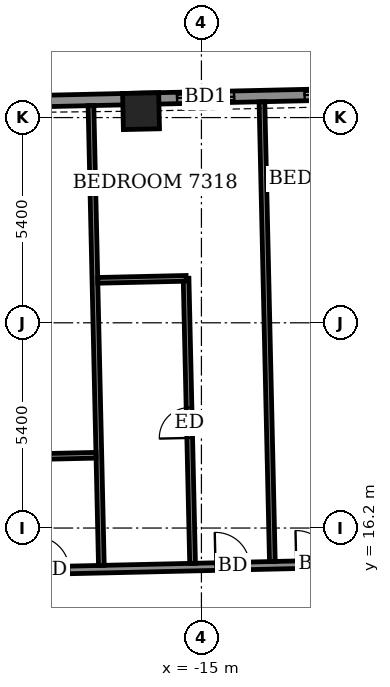
"""IFC4 building model, lengths in metres.
Left out: names, types, materials, properties, quantities, classifications, styles, units other than length and angle.
Written with IfcOpenShell. Run it as: python <this file> out.ifc"""

import sys

from ifc_helpers import new_model, si_unit, direction, frame, frame_2d, origin, origin_2d, place, context, subcontext, project, spatial, rectangle, extrude, element, fill, save


model = new_model("IFC4")
c1 = context("Model", 3, precision=1e-05, world=origin(), true_north=direction((0.0, 1.0)))
c2 = subcontext(c1, "Body", "Model", "MODEL_VIEW")
j1 = project(units=[si_unit("LENGTHUNIT", "METRE"), si_unit("PLANEANGLEUNIT", "RADIAN")], contexts=[c1])
p1 = place(None, origin())
s1 = spatial("IfcSite", under=j1, at=p1, CompositionType="ELEMENT")
p2 = place(p1, origin())
s2 = spatial("IfcBuilding", under=s1, at=p2, CompositionType="ELEMENT")
p3 = place(p2, frame((0.0, 0.0, 287.1)))
s3 = spatial("IfcBuildingStorey", under=s2, at=p3, CompositionType="ELEMENT", Elevation=287.1)
p4 = place(p3, frame((-16.589, 27.169, -0.55), z_axis=(0.0, 0.0, 1.0), x_axis=(-0.9997425919, -0.02268810132, 0.0)))
e1 = element("IfcColumn", 1, at=p4, inside=s3, PredefinedType="COLUMN", context=c2, shape_type="SweptSolid", body=[
    extrude(rectangle(XDim=0.95, YDim=0.95, at=origin_2d()), origin(), (0.0, 0.0, 1.0), 3.6),
])
p5 = place(p3, frame((26.216, 28.465, 0.0), z_axis=(0.0, 0.0, 1.0), x_axis=(-0.999742843677, -0.022677004157, 0.0)))
e2 = element("IfcWall", 2, at=p5, inside=s3, PredefinedType="SOLIDWALL", context=c2, shape_type="SweptSolid", body=[
    extrude(rectangle(XDim=49.836, YDim=0.3, at=frame_2d((24.918, 0.0))), origin(), (0.0, 0.0, 1.0), 2.5),
])
p6 = place(p5, frame((0.938, 0.0, 0.0)))
e3 = element("IfcOpeningElement", 3, at=p6, cuts=e2, PredefinedType="OPENING", context=c2, shape_type="SweptSolid", body=[
    extrude(rectangle(XDim=1.5, YDim=2.4, at=frame_2d((0.75, 1.2))), frame((0.0, 0.16, 0.0), z_axis=(0.0, -1.0, 0.0), x_axis=(1.0, 0.0, 0.0)), (0.0, 0.0, 1.0), 0.32),
])
p7 = place(p5, frame((4.087, 0.0, 0.0)))
e4 = element("IfcOpeningElement", 4, at=p7, cuts=e2, PredefinedType="OPENING", context=c2, shape_type="SweptSolid", body=[
    extrude(rectangle(XDim=1.5, YDim=2.4, at=frame_2d((0.75, 1.2))), frame((0.0, 0.16, 0.0), z_axis=(0.0, -1.0, 0.0), x_axis=(1.0, 0.0, 0.0)), (0.0, 0.0, 1.0), 0.32),
])
p8 = place(p5, frame((8.711, 0.0, 0.0)))
e5 = element("IfcOpeningElement", 5, at=p8, cuts=e2, PredefinedType="OPENING", context=c2, shape_type="SweptSolid", body=[
    extrude(rectangle(XDim=1.5, YDim=2.4, at=frame_2d((0.75, 1.2))), frame((0.0, 0.16, 0.0), z_axis=(0.0, -1.0, 0.0), x_axis=(1.0, 0.0, 0.0)), (0.0, 0.0, 1.0), 0.32),
])
p9 = place(p5, frame((12.067, 0.0, 0.0)))
e6 = element("IfcOpeningElement", 6, at=p9, cuts=e2, PredefinedType="OPENING", context=c2, shape_type="SweptSolid", body=[
    extrude(rectangle(XDim=1.5, YDim=2.4, at=frame_2d((0.75, 1.2))), frame((0.0, 0.16, 0.0), z_axis=(0.0, -1.0, 0.0), x_axis=(1.0, 0.0, 0.0)), (0.0, 0.0, 1.0), 0.32),
])
p10 = place(p5, frame((17.836, 0.0, 0.0)))
e7 = element("IfcOpeningElement", 7, at=p10, cuts=e2, PredefinedType="OPENING", context=c2, shape_type="SweptSolid", body=[
    extrude(rectangle(XDim=1.5, YDim=2.4, at=frame_2d((0.75, 1.2))), frame((0.0, 0.16, 0.0), z_axis=(0.0, -1.0, 0.0), x_axis=(1.0, 0.0, 0.0)), (0.0, 0.0, 1.0), 0.32),
])
p11 = place(p5, frame((22.849, 0.0, 0.0)))
e8 = element("IfcOpeningElement", 8, at=p11, cuts=e2, PredefinedType="OPENING", context=c2, shape_type="SweptSolid", body=[
    extrude(rectangle(XDim=1.5, YDim=2.4, at=frame_2d((0.75, 1.2))), frame((0.0, 0.16, 0.0), z_axis=(0.0, -1.0, 0.0), x_axis=(1.0, 0.0, 0.0)), (0.0, 0.0, 1.0), 0.32),
])
p12 = place(p5, frame((26.205, 0.0, 0.0)))
e9 = element("IfcOpeningElement", 9, at=p12, cuts=e2, PredefinedType="OPENING", context=c2, shape_type="SweptSolid", body=[
    extrude(rectangle(XDim=1.5, YDim=2.4, at=frame_2d((0.75, 1.2))), frame((0.0, 0.16, 0.0), z_axis=(0.0, -1.0, 0.0), x_axis=(1.0, 0.0, 0.0)), (0.0, 0.0, 1.0), 0.32),
])
p13 = place(p5, frame((32.011, 0.0, 0.0)))
e10 = element("IfcOpeningElement", 10, at=p13, cuts=e2, PredefinedType="OPENING", context=c2, shape_type="SweptSolid", body=[
    extrude(rectangle(XDim=1.5, YDim=2.4, at=frame_2d((0.75, 1.2))), frame((0.0, 0.16, 0.0), z_axis=(0.0, -1.0, 0.0), x_axis=(1.0, 0.0, 0.0)), (0.0, 0.0, 1.0), 0.32),
])
p14 = place(p5, frame((37.011, 0.0, 0.0)))
e11 = element("IfcOpeningElement", 11, at=p14, cuts=e2, PredefinedType="OPENING", context=c2, shape_type="SweptSolid", body=[
    extrude(rectangle(XDim=1.5, YDim=2.4, at=frame_2d((0.75, 1.2))), frame((0.0, 0.16, 0.0), z_axis=(0.0, -1.0, 0.0), x_axis=(1.0, 0.0, 0.0)), (0.0, 0.0, 1.0), 0.32),
])
p15 = place(p5, frame((40.367, 0.0, 0.0)))
e12 = element("IfcOpeningElement", 12, at=p15, cuts=e2, PredefinedType="OPENING", context=c2, shape_type="SweptSolid", body=[
    extrude(rectangle(XDim=1.5, YDim=2.4, at=frame_2d((0.75, 1.2))), frame((0.0, 0.16, 0.0), z_axis=(0.0, -1.0, 0.0), x_axis=(1.0, 0.0, 0.0)), (0.0, 0.0, 1.0), 0.32),
])
p16 = place(p5, frame((45.499, 0.0, 0.9)))
e13 = element("IfcOpeningElement", 13, at=p16, cuts=e2, PredefinedType="OPENING", context=c2, shape_type="SweptSolid", body=[
    extrude(rectangle(XDim=2.4, YDim=1.5, at=frame_2d((1.2, 0.75))), frame((0.0, 0.16, 0.0), z_axis=(0.0, -1.0, 0.0), x_axis=(1.0, 0.0, 0.0)), (0.0, 0.0, 1.0), 0.32),
])
p17 = place(p3, frame((-26.401, 14.918, 0.0), z_axis=(0.0, 0.0, 1.0), x_axis=(0.99974239733, 0.022696673341, 0.0)))
e14 = element("IfcWall", 14, at=p17, inside=s3, PredefinedType="PARTITIONING", context=c2, shape_type="SweptSolid", body=[
    extrude(rectangle(XDim=55.386, YDim=0.2, at=frame_2d((27.693, 0.0))), origin(), (0.0, 0.0, 1.0), 3.05),
])
p18 = place(p17, frame((52.889, 0.0, 0.0)))
e15 = element("IfcOpeningElement", 15, at=p18, cuts=e14, PredefinedType="OPENING", context=c2, shape_type="SweptSolid", body=[
    extrude(rectangle(XDim=1.0, YDim=2.1, at=frame_2d((0.5, 1.05))), frame((0.0, 0.11, 0.0), z_axis=(0.0, -1.0, 0.0), x_axis=(1.0, 0.0, 0.0)), (0.0, 0.0, 1.0), 0.22),
])
p19 = place(p17, frame((48.6, 0.0, 0.0)))
e16 = element("IfcOpeningElement", 16, at=p19, cuts=e14, PredefinedType="OPENING", context=c2, shape_type="SweptSolid", body=[
    extrude(rectangle(XDim=0.9, YDim=2.1, at=frame_2d((0.45, 1.05))), frame((0.0, 0.11, 0.0), z_axis=(0.0, -1.0, 0.0), x_axis=(1.0, 0.0, 0.0)), (0.0, 0.0, 1.0), 0.22),
])
p20 = place(p17, frame((41.8, 0.0, 0.0)))
e17 = element("IfcOpeningElement", 17, at=p20, cuts=e14, PredefinedType="OPENING", context=c2, shape_type="SweptSolid", body=[
    extrude(rectangle(XDim=0.9, YDim=2.1, at=frame_2d((0.45, 1.05))), frame((0.0, 0.11, 0.0), z_axis=(0.0, -1.0, 0.0), x_axis=(1.0, 0.0, 0.0)), (0.0, 0.0, 1.0), 0.22),
])
p21 = place(p17, frame((39.675, 0.0, 0.0)))
e18 = element("IfcOpeningElement", 18, at=p21, cuts=e14, PredefinedType="OPENING", context=c2, shape_type="SweptSolid", body=[
    extrude(rectangle(XDim=0.9, YDim=2.1, at=frame_2d((0.45, 1.05))), frame((0.0, 0.11, 0.0), z_axis=(0.0, -1.0, 0.0), x_axis=(1.0, 0.0, 0.0)), (0.0, 0.0, 1.0), 0.22),
])
p22 = place(p17, frame((32.675, 0.0, 0.0)))
e19 = element("IfcOpeningElement", 19, at=p22, cuts=e14, PredefinedType="OPENING", context=c2, shape_type="SweptSolid", body=[
    extrude(rectangle(XDim=0.9, YDim=2.1, at=frame_2d((0.45, 1.05))), frame((0.0, 0.11, 0.0), z_axis=(0.0, -1.0, 0.0), x_axis=(1.0, 0.0, 0.0)), (0.0, 0.0, 1.0), 0.22),
])
p23 = place(p17, frame((30.4, 0.0, 0.0)))
e20 = element("IfcOpeningElement", 20, at=p23, cuts=e14, PredefinedType="OPENING", context=c2, shape_type="SweptSolid", body=[
    extrude(rectangle(XDim=0.9, YDim=2.1, at=frame_2d((0.45, 1.05))), frame((0.0, 0.11, 0.0), z_axis=(0.0, -1.0, 0.0), x_axis=(1.0, 0.0, 0.0)), (0.0, 0.0, 1.0), 0.22),
])
p24 = place(p17, frame((23.225, 0.0, 0.0)))
e21 = element("IfcOpeningElement", 21, at=p24, cuts=e14, PredefinedType="OPENING", context=c2, shape_type="SweptSolid", body=[
    extrude(rectangle(XDim=0.9, YDim=2.1, at=frame_2d((0.45, 1.05))), frame((0.0, 0.11, 0.0), z_axis=(0.0, -1.0, 0.0), x_axis=(1.0, 0.0, 0.0)), (0.0, 0.0, 1.0), 0.22),
])
p25 = place(p17, frame((20.9, 0.0, 0.0)))
e22 = element("IfcOpeningElement", 22, at=p25, cuts=e14, PredefinedType="OPENING", context=c2, shape_type="SweptSolid", body=[
    extrude(rectangle(XDim=0.9, YDim=2.1, at=frame_2d((0.45, 1.05))), frame((0.0, 0.11, 0.0), z_axis=(0.0, -1.0, 0.0), x_axis=(1.0, 0.0, 0.0)), (0.0, 0.0, 1.0), 0.22),
])
p26 = place(p17, frame((13.9, 0.0, 0.0)))
e23 = element("IfcOpeningElement", 23, at=p26, cuts=e14, PredefinedType="OPENING", context=c2, shape_type="SweptSolid", body=[
    extrude(rectangle(XDim=0.9, YDim=2.1, at=frame_2d((0.45, 1.05))), frame((0.0, 0.11, 0.0), z_axis=(0.0, -1.0, 0.0), x_axis=(1.0, 0.0, 0.0)), (0.0, 0.0, 1.0), 0.22),
])
p27 = place(p17, frame((11.775, 0.0, 0.0)))
e24 = element("IfcOpeningElement", 24, at=p27, cuts=e14, PredefinedType="OPENING", context=c2, shape_type="SweptSolid", body=[
    extrude(rectangle(XDim=0.9, YDim=2.1, at=frame_2d((0.45, 1.05))), frame((0.0, 0.11, 0.0), z_axis=(0.0, -1.0, 0.0), x_axis=(1.0, 0.0, 0.0)), (0.0, 0.0, 1.0), 0.22),
])
p28 = place(p17, frame((1.65, 0.0, 0.0)))
e25 = element("IfcOpeningElement", 25, at=p28, cuts=e14, PredefinedType="OPENING", context=c2, shape_type="SweptSolid", body=[
    extrude(rectangle(XDim=1.0, YDim=2.1, at=frame_2d((0.5, 1.05))), frame((0.0, 0.11, 0.0), z_axis=(0.0, -1.0, 0.0), x_axis=(1.0, 0.0, 0.0)), (0.0, 0.0, 1.0), 0.22),
])
p29 = place(p17, frame((7.025, 0.0, 0.0)))
e26 = element("IfcOpeningElement", 26, at=p29, cuts=e14, PredefinedType="OPENING", context=c2, shape_type="SweptSolid", body=[
    extrude(rectangle(XDim=0.9, YDim=2.1, at=frame_2d((0.45, 1.05))), frame((0.0, 0.11, 0.0), z_axis=(0.0, -1.0, 0.0), x_axis=(1.0, 0.0, 0.0)), (0.0, 0.0, 1.0), 0.22),
])
p30 = place(p3, frame((-17.633, 15.217, 0.0), z_axis=(0.0, 0.0, 1.0), x_axis=(-0.02263844782, 0.9997437175, 0.0)))
e27 = element("IfcWall", 27, at=p30, inside=s3, PredefinedType="PARTITIONING", context=c2, shape_type="SweptSolid", body=[
    extrude(rectangle(XDim=12.1, YDim=0.15, at=frame_2d((6.05, 0.0))), origin(), (0.0, 0.0, 1.0), 2.55),
])
p31 = place(p3, frame((-15.233, 15.272, 0.0), z_axis=(0.0, 0.0, 1.0), x_axis=(-0.022819011082, 0.999739612466, 0.0)))
e28 = element("IfcWall", 28, at=p31, inside=s3, PredefinedType="PARTITIONING", context=c2, shape_type="SweptSolid", body=[
    extrude(rectangle(XDim=7.5, YDim=0.15, at=frame_2d((3.75, 0.0))), origin(), (0.0, 0.0, 1.0), 3.05),
])
p32 = place(p31, frame((3.3, 0.0, 0.0)))
e29 = element("IfcOpeningElement", 29, at=p32, cuts=e28, PredefinedType="OPENING", context=c2, shape_type="SweptSolid", body=[
    extrude(rectangle(XDim=0.8, YDim=2.1, at=frame_2d((0.4, 1.05))), frame((0.0, 0.085, 0.0), z_axis=(0.0, -1.0, 0.0), x_axis=(1.0, 0.0, 0.0)), (0.0, 0.0, 1.0), 0.17),
])
p33 = place(p3, frame((-13.134, 15.319, 0.0), z_axis=(0.0, 0.0, 1.0), x_axis=(-0.02263844782, 0.9997437175, 0.0)))
e30 = element("IfcWall", 30, at=p33, inside=s3, PredefinedType="PARTITIONING", context=c2, shape_type="SweptSolid", body=[
    extrude(rectangle(XDim=12.1, YDim=0.15, at=frame_2d((6.05, 0.0))), origin(), (0.0, 0.0, 1.0), 2.5),
])
p34 = place(p3, frame((-20.296, 18.057, 0.0), z_axis=(0.0, 0.0, 1.0), x_axis=(0.999735102249, 0.023015762656, 0.0)))
e31 = element("IfcWall", 31, at=p34, inside=s3, PredefinedType="PARTITIONING", context=c2, shape_type="SweptSolid", body=[
    extrude(rectangle(XDim=2.525, YDim=0.15, at=frame_2d((1.262, 0.0))), origin(), (0.0, 0.0, 1.0), 3.05),
])
p35 = place(p3, frame((-17.726, 22.717, 0.0), z_axis=(0.0, 0.0, 1.0), x_axis=(0.999740260747, 0.02279059109, 0.0)))
e32 = element("IfcWall", 32, at=p35, inside=s3, PredefinedType="PARTITIONING", context=c2, shape_type="SweptSolid", body=[
    extrude(rectangle(XDim=2.324, YDim=0.15, at=frame_2d((1.162, 0.0))), origin(), (0.0, 0.0, 1.0), 3.05),
])
p36 = place(p14, origin())
e33 = element("IfcDoor", 33, at=p36, inside=s3, OperationType="SLIDING_TO_LEFT", PredefinedType="DOOR", context=c2, shape_type="SweptSolid", body=[
    extrude(rectangle(XDim=1.5, YDim=2.4, at=frame_2d((0.75, 1.2))), frame((0.0, 0.025, 0.0), z_axis=(0.0, -1.0, 0.0), x_axis=(1.0, 0.0, 0.0)), (0.0, 0.0, 1.0), 0.05),
])
fill(e11, e33)
p37 = place(p15, origin())
e34 = element("IfcDoor", 34, at=p37, inside=s3, OperationType="SLIDING_TO_LEFT", PredefinedType="DOOR", context=c2, shape_type="SweptSolid", body=[
    extrude(rectangle(XDim=1.5, YDim=2.4, at=frame_2d((0.75, 1.2))), frame((0.0, 0.025, 0.0), z_axis=(0.0, -1.0, 0.0), x_axis=(1.0, 0.0, 0.0)), (0.0, 0.0, 1.0), 0.05),
])
fill(e12, e34)
p38 = place(p26, origin())
e35 = element("IfcDoor", 35, at=p38, inside=s3, OperationType="SINGLE_SWING_LEFT", PredefinedType="DOOR", context=c2, shape_type="SweptSolid", body=[
    extrude(rectangle(XDim=0.9, YDim=2.1, at=frame_2d((0.45, 1.05))), frame((0.0, 0.025, 0.0), z_axis=(0.0, -1.0, 0.0), x_axis=(1.0, 0.0, 0.0)), (0.0, 0.0, 1.0), 0.05),
])
fill(e23, e35)
p39 = place(p27, origin())
e36 = element("IfcDoor", 36, at=p39, inside=s3, OperationType="SINGLE_SWING_RIGHT", PredefinedType="DOOR", context=c2, shape_type="SweptSolid", body=[
    extrude(rectangle(XDim=0.9, YDim=2.1, at=frame_2d((0.45, 1.05))), frame((0.0, 0.025, 0.0), z_axis=(0.0, -1.0, 0.0), x_axis=(1.0, 0.0, 0.0)), (0.0, 0.0, 1.0), 0.05),
])
fill(e24, e36)
p40 = place(p32, origin())
e37 = element("IfcDoor", 37, at=p40, inside=s3, OperationType="SINGLE_SWING_RIGHT", PredefinedType="DOOR", context=c2, shape_type="SweptSolid", body=[
    extrude(rectangle(XDim=0.8, YDim=2.1, at=frame_2d((0.4, 1.05))), frame((0.0, 0.025, 0.0), z_axis=(0.0, -1.0, 0.0), x_axis=(1.0, 0.0, 0.0)), (0.0, 0.0, 1.0), 0.05),
])
fill(e29, e37)
p41 = place(p29, origin())
e38 = element("IfcDoor", 38, at=p41, inside=s3, OperationType="SINGLE_SWING_LEFT", PredefinedType="DOOR", context=c2, shape_type="SweptSolid", body=[
    extrude(rectangle(XDim=0.9, YDim=2.1, at=frame_2d((0.45, 1.05))), frame((0.0, 0.025, 0.0), z_axis=(0.0, -1.0, 0.0), x_axis=(1.0, 0.0, 0.0)), (0.0, 0.0, 1.0), 0.05),
])
fill(e26, e38)
save(model, sys.argv[1])
